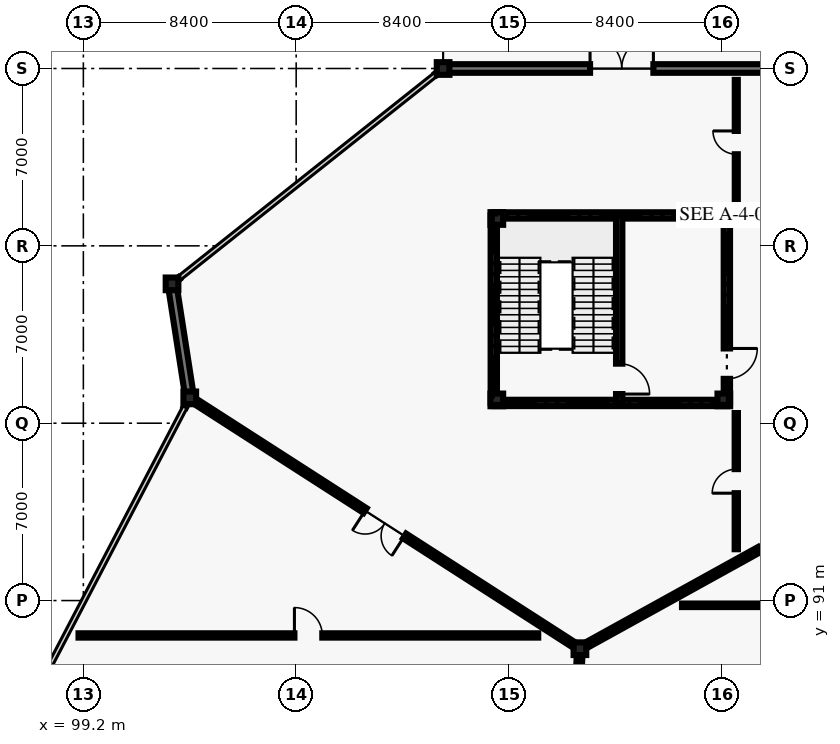
"""IFC4 building model, lengths in metres.
Left out: names, types, materials, properties, quantities, classifications, styles, units other than length and angle.
Written with IfcOpenShell. Run it as: python <this file> out.ifc"""

import sys

from ifc_helpers import new_model, si_unit, direction, frame, frame_2d, origin, origin_2d, place, context, subcontext, project, spatial, rectangle, i_section, extrude, element, fill, save


model = new_model("IFC4")
c1 = context("Model", 3, precision=1e-05, world=origin(), true_north=direction((0.0, 1.0)))
c2 = subcontext(c1, "Body", "Model", "MODEL_VIEW")
j1 = project(units=[si_unit("LENGTHUNIT", "METRE"), si_unit("PLANEANGLEUNIT", "RADIAN")], contexts=[c1])
p1 = place(None, origin())
s1 = spatial("IfcSite", under=j1, at=p1, CompositionType="ELEMENT")
p2 = place(p1, origin())
s2 = spatial("IfcBuilding", under=s1, at=p2, CompositionType="ELEMENT")
p3 = place(p2, origin())
s3 = spatial("IfcBuildingStorey", under=s2, at=p3, CompositionType="ELEMENT", Elevation=0.0)
for number, where, z_axis, x_axis in (
    (1, (102.7, 103.5, 0.0), (0.0, 0.0, 1.0), (1.0, 0.0, 0.0)),
    (2, (103.4, 99.0, 0.0), (0.0, 0.0, 1.0), (1.0, 0.0, 0.0)),
    (3, (113.4, 112.0, 0.0), (0.0, 0.0, 1.0), (1.0, 0.0, 0.0)),
    (4, (118.8, 89.1, 0.0), (0.0, 0.0, 1.0), (1.0, 0.0, 0.0)),
    (5, (115.52, 98.92, 0.0), (0.0, 0.0, 1.0), (1.0, 0.0, 0.0)),
    (6, (124.48, 98.92, 0.0), (0.0, 0.0, 1.0), (1.0, 0.0, 0.0)),
    (7, (124.48, 106.08, 0.0), (0.0, 0.0, 1.0), (1.0, 0.0, 0.0)),
    (8, (115.52, 106.08, 0.0), (0.0, 0.0, 1.0), (1.0, 0.0, 0.0)),
):
    element("IfcColumn", number, at=place(p3, frame(where, z_axis=z_axis, x_axis=x_axis)), inside=s3, PredefinedType="COLUMN", context=c2, shape_type="SweptSolid", body=[
        extrude(i_section(OverallWidth=0.5, OverallDepth=0.5, WebThickness=0.022, FlangeThickness=0.036, at=origin_2d()), origin(), (0.0, 0.0, 1.0), 5.4),
    ])
p4 = place(p3, frame((103.21, 98.637, 0.0), z_axis=(0.0, 0.0, 1.0), x_axis=(0.464243799771, 0.885707454171, 0.0)))
e9 = element("IfcWall", 9, at=p4, inside=s3, PredefinedType="SOLIDWALL", context=c2, shape_type="SweptSolid", body=[
    extrude(rectangle(XDim=0.308, YDim=0.095, at=frame_2d((0.154, 0.0))), origin(), (0.0, 0.0, 1.0), 4.22),
])
p5 = place(p3, frame((113.4, 112.0, 0.0), z_axis=(0.0, 0.0, 1.0), x_axis=(1.0, 0.0, 0.0)))
e10 = element("IfcWall", 10, at=p5, inside=s3, PredefinedType="SOLIDWALL", context=c2, shape_type="SweptSolid", body=[
    extrude(rectangle(XDim=14.1, YDim=0.34, at=frame_2d((7.05, 0.0))), origin(), (0.0, 0.0, 1.0), 4.22),
])
p6 = place(p5, frame((5.8, 0.0, 0.0)))
e11 = element("IfcOpeningElement", 11, at=p6, cuts=e10, PredefinedType="OPENING", context=c2, shape_type="SweptSolid", body=[
    extrude(rectangle(XDim=2.5, YDim=2.45, at=frame_2d((1.25, 1.225))), frame((0.0, 0.18, 0.0), z_axis=(0.0, -1.0, 0.0), x_axis=(1.0, 0.0, 0.0)), (0.0, 0.0, 1.0), 0.36),
])
p7 = place(p3, frame((102.733, 103.526, 0.0), z_axis=(0.0, 0.0, 1.0), x_axis=(0.782180115256, 0.623052379257, 0.0)))
e12 = element("IfcWall", 12, at=p7, inside=s3, PredefinedType="SOLIDWALL", context=c2, shape_type="SweptSolid", body=[
    extrude(rectangle(XDim=0.308, YDim=0.095, at=frame_2d((0.154, 0.0))), origin(), (0.0, 0.0, 1.0), 4.22),
])
p8 = place(p3, frame((113.126, 111.782, 0.0), z_axis=(0.0, 0.0, 1.0), x_axis=(0.781872503851, 0.6234383592, 0.0)))
e13 = element("IfcWall", 13, at=p8, inside=s3, PredefinedType="SOLIDWALL", context=c2, shape_type="SweptSolid", body=[
    extrude(rectangle(XDim=0.308, YDim=0.095, at=frame_2d((0.154, 0.0))), origin(), (0.0, 0.0, 1.0), 4.22),
])
p9 = place(p3, frame((103.391, 99.059, 0.0), z_axis=(0.0, 0.0, 1.0), x_axis=(-0.153783616147, 0.988104548823, 0.0)))
e14 = element("IfcWall", 14, at=p9, inside=s3, PredefinedType="SOLIDWALL", context=c2, shape_type="SweptSolid", body=[
    extrude(rectangle(XDim=4.494, YDim=0.34, at=frame_2d((2.247, 0.0))), origin(), (0.0, 0.0, 1.0), 4.22),
])
p10 = place(p3, frame((117.9, 70.6, 0.0), z_axis=(0.0, 0.0, 1.0), x_axis=(0.048599072515, 0.998818366947, 0.0)))
e15 = element("IfcWall", 15, at=p10, inside=s3, PredefinedType="SOLIDWALL", context=c2, shape_type="SweptSolid", body=[
    extrude(rectangle(XDim=18.522, YDim=0.225, at=frame_2d((9.261, 0.0))), origin(), (0.0, 0.0, 1.0), 4.62),
])
p11 = place(p10, frame((8.261, 0.0, 0.0)))
e16 = element("IfcOpeningElement", 16, at=p11, cuts=e15, PredefinedType="OPENING", context=c2, shape_type="SweptSolid", body=[
    extrude(rectangle(XDim=2.0, YDim=2.5, at=frame_2d((1.0, 1.25))), frame((0.0, 0.123, 0.0), z_axis=(0.0, -1.0, 0.0), x_axis=(1.0, 0.0, 0.0)), (0.0, 0.0, 1.0), 0.245),
])
p12 = place(p3, frame((118.8, 89.1, 0.0), z_axis=(0.0, 0.0, 1.0), x_axis=(-0.841183241423, 0.540750177392, 0.0)))
e17 = element("IfcWall", 17, at=p12, inside=s3, PredefinedType="SOLIDWALL", context=c2, shape_type="SweptSolid", body=[
    extrude(rectangle(XDim=18.308, YDim=0.225, at=frame_2d((9.154, 0.0))), origin(), (0.0, 0.0, 1.0), 4.62),
])
p13 = place(p12, frame((8.229, 0.0, 0.0)))
e18 = element("IfcOpeningElement", 18, at=p13, cuts=e17, PredefinedType="OPENING", context=c2, shape_type="SweptSolid", body=[
    extrude(rectangle(XDim=1.85, YDim=2.4, at=frame_2d((0.925, 1.2))), frame((0.0, 0.123, 0.0), z_axis=(0.0, -1.0, 0.0), x_axis=(1.0, 0.0, 0.0)), (0.0, 0.0, 1.0), 0.245),
])
p14 = place(p3, frame((134.9, 98.0, 0.0), z_axis=(0.0, 0.0, 1.0), x_axis=(-0.875181353329, -0.483794996652, 0.0)))
e19 = element("IfcWall", 19, at=p14, inside=s3, PredefinedType="SOLIDWALL", context=c2, shape_type="SweptSolid", body=[
    extrude(rectangle(XDim=18.396, YDim=0.225, at=frame_2d((9.198, 0.0))), origin(), (0.0, 0.0, 1.0), 4.62),
])
p15 = place(p14, frame((8.098, 0.0, 0.0)))
e20 = element("IfcOpeningElement", 20, at=p15, cuts=e19, PredefinedType="OPENING", context=c2, shape_type="SweptSolid", body=[
    extrude(rectangle(XDim=2.2, YDim=2.6, at=frame_2d((1.1, 1.3))), frame((0.0, 0.123, 0.0), z_axis=(0.0, -1.0, 0.0), x_axis=(1.0, 0.0, 0.0)), (0.0, 0.0, 1.0), 0.245),
])
p16 = place(p3, frame((99.009, 89.623, 0.0), z_axis=(0.0, 0.0, 1.0), x_axis=(1.0, 0.0, 0.0)))
e21 = element("IfcWall", 21, at=p16, inside=s3, PredefinedType="PARTITIONING", context=c2, shape_type="SweptSolid", body=[
    extrude(rectangle(XDim=18.145, YDim=0.17, at=frame_2d((9.073, 0.0))), origin(), (0.0, 0.0, 1.0), 3.92),
])
p17 = place(p16, frame((8.522, 0.0, 0.0)))
e22 = element("IfcOpeningElement", 22, at=p17, cuts=e21, PredefinedType="OPENING", context=c2, shape_type="SweptSolid", body=[
    extrude(rectangle(XDim=1.1, YDim=2.2, at=frame_2d((0.55, 1.1))), frame((0.0, 0.095, 0.0), z_axis=(0.0, -1.0, 0.0), x_axis=(1.0, 0.0, 0.0)), (0.0, 0.0, 1.0), 0.19),
])
p18 = place(p3, frame((122.829, 90.813, 0.0), z_axis=(0.0, 0.0, 1.0), x_axis=(1.0, 0.0, 0.0)))
e23 = element("IfcWall", 23, at=p18, inside=s3, PredefinedType="PARTITIONING", context=c2, shape_type="SweptSolid", body=[
    extrude(rectangle(XDim=16.141, YDim=0.14, at=frame_2d((8.07, 0.0))), origin(), (0.0, 0.0, 1.0), 3.92),
])
p19 = place(p18, frame((7.581, 0.0, 0.0)))
e24 = element("IfcOpeningElement", 24, at=p19, cuts=e23, PredefinedType="OPENING", context=c2, shape_type="SweptSolid", body=[
    extrude(rectangle(XDim=0.98, YDim=2.15, at=frame_2d((0.49, 1.075))), frame((0.0, 0.08, 0.0), z_axis=(0.0, -1.0, 0.0), x_axis=(1.0, 0.0, 0.0)), (0.0, 0.0, 1.0), 0.16),
])
p20 = place(p3, frame((124.972, 93.026, 0.0), z_axis=(0.0, 0.0, 1.0), x_axis=(0.0, 1.0, 0.0)))
e25 = element("IfcWall", 25, at=p20, inside=s3, PredefinedType="PARTITIONING", context=c2, shape_type="SweptSolid", body=[
    extrude(rectangle(XDim=5.374, YDim=0.13, at=frame_2d((2.687, 0.0))), origin(), (0.0, 0.0, 1.0), 3.92),
])
p21 = place(p20, frame((2.212, 0.0, 0.0)))
e26 = element("IfcOpeningElement", 26, at=p21, cuts=e25, PredefinedType="OPENING", context=c2, shape_type="SweptSolid", body=[
    extrude(rectangle(XDim=0.95, YDim=2.15, at=frame_2d((0.475, 1.075))), frame((0.0, 0.075, 0.0), z_axis=(0.0, -1.0, 0.0), x_axis=(1.0, 0.0, 0.0)), (0.0, 0.0, 1.0), 0.15),
])
p22 = place(p3, frame((124.972, 106.6, 0.0), z_axis=(0.0, 0.0, 1.0), x_axis=(0.0, 1.0, 0.0)))
e27 = element("IfcWall", 27, at=p22, inside=s3, PredefinedType="PARTITIONING", context=c2, shape_type="SweptSolid", body=[
    extrude(rectangle(XDim=4.95, YDim=0.12, at=frame_2d((2.475, 0.0))), origin(), (0.0, 0.0, 1.0), 3.92),
])
p23 = place(p22, frame((2.015, 0.0, 0.0)))
e28 = element("IfcOpeningElement", 28, at=p23, cuts=e27, PredefinedType="OPENING", context=c2, shape_type="SweptSolid", body=[
    extrude(rectangle(XDim=0.92, YDim=2.1, at=frame_2d((0.46, 1.05))), frame((0.0, 0.07, 0.0), z_axis=(0.0, -1.0, 0.0), x_axis=(1.0, 0.0, 0.0)), (0.0, 0.0, 1.0), 0.14),
])
p24 = place(p3, frame((115.4, 98.8, 0.0), z_axis=(0.0, 0.0, 1.0), x_axis=(0.0, 1.0, 0.0)))
e29 = element("IfcWall", 29, at=p24, inside=s3, PredefinedType="SHEAR", context=c2, shape_type="SweptSolid", body=[
    extrude(rectangle(XDim=7.4, YDim=0.25, at=frame_2d((3.7, 0.0))), origin(), (0.0, 0.0, 1.0), 5.16),
])
for number, where, z_axis, x_axis in (
    (30, (115.4, 106.2, 0.0), (0.0, 0.0, 1.0), (1.0, 0.0, 0.0)),
    (31, (124.6, 98.8, 0.0), (0.0, 0.0, 1.0), (-1.0, 0.0, 0.0)),
):
    element("IfcWall", number, at=place(p3, frame(where, z_axis=z_axis, x_axis=x_axis)), inside=s3, PredefinedType="SHEAR", context=c2, shape_type="SweptSolid", body=[
        extrude(rectangle(XDim=9.2, YDim=0.25, at=frame_2d((4.6, 0.0))), origin(), (0.0, 0.0, 1.0), 5.16),
    ])
p25 = place(p3, frame((124.6, 106.2, 0.0), z_axis=(0.0, 0.0, 1.0), x_axis=(0.0, -1.0, 0.0)))
e32 = element("IfcWall", 32, at=p25, inside=s3, PredefinedType="SHEAR", context=c2, shape_type="SweptSolid", body=[
    extrude(rectangle(XDim=7.4, YDim=0.25, at=frame_2d((3.7, 0.0))), origin(), (0.0, 0.0, 1.0), 5.16),
])
p26 = place(p25, frame((5.25, 0.0, 0.0)))
e33 = element("IfcOpeningElement", 33, at=p26, cuts=e32, PredefinedType="OPENING", context=c2, shape_type="SweptSolid", body=[
    extrude(rectangle(XDim=1.2, YDim=2.2, at=frame_2d((0.6, 1.1))), frame((0.0, 0.135, 0.0), z_axis=(0.0, -1.0, 0.0), x_axis=(1.0, 0.0, 0.0)), (0.0, 0.0, 1.0), 0.27),
])
p27 = place(p3, frame((120.35, 106.2, 0.0), z_axis=(0.0, 0.0, 1.0), x_axis=(0.0, -1.0, 0.0)))
e34 = element("IfcWall", 34, at=p27, inside=s3, PredefinedType="SHEAR", context=c2, shape_type="SweptSolid", body=[
    extrude(rectangle(XDim=7.4, YDim=0.25, at=frame_2d((3.7, 0.0))), origin(), (0.0, 0.0, 1.0), 5.16),
])
p28 = place(p27, frame((5.85, 0.0, 0.0)))
e35 = element("IfcOpeningElement", 35, at=p28, cuts=e34, PredefinedType="OPENING", context=c2, shape_type="SweptSolid", body=[
    extrude(rectangle(XDim=1.2, YDim=2.2, at=frame_2d((0.6, 1.1))), frame((0.0, 0.135, 0.0), z_axis=(0.0, -1.0, 0.0), x_axis=(1.0, 0.0, 0.0)), (0.0, 0.0, 1.0), 0.27),
])
p29 = place(p6, origin())
e36 = element("IfcDoor", 36, at=p29, inside=s3, OperationType="DOUBLE_DOOR_SINGLE_SWING", PredefinedType="DOOR", context=c2, shape_type="SweptSolid", body=[
    extrude(rectangle(XDim=2.5, YDim=2.45, at=frame_2d((1.25, 1.225))), frame((0.0, 0.025, 0.0), z_axis=(0.0, -1.0, 0.0), x_axis=(1.0, 0.0, 0.0)), (0.0, 0.0, 1.0), 0.05),
])
fill(e11, e36)
p30 = place(p13, origin())
e37 = element("IfcDoor", 37, at=p30, inside=s3, OperationType="DOUBLE_DOOR_SINGLE_SWING", PredefinedType="DOOR", context=c2, shape_type="SweptSolid", body=[
    extrude(rectangle(XDim=1.85, YDim=2.4, at=frame_2d((0.925, 1.2))), frame((0.0, 0.025, 0.0), z_axis=(0.0, -1.0, 0.0), x_axis=(1.0, 0.0, 0.0)), (0.0, 0.0, 1.0), 0.05),
])
fill(e18, e37)
p31 = place(p15, origin())
e38 = element("IfcDoor", 38, at=p31, inside=s3, OperationType="DOUBLE_DOOR_SINGLE_SWING", PredefinedType="DOOR", context=c2, shape_type="SweptSolid", body=[
    extrude(rectangle(XDim=2.2, YDim=2.6, at=frame_2d((1.1, 1.3))), frame((0.0, 0.025, 0.0), z_axis=(0.0, -1.0, 0.0), x_axis=(1.0, 0.0, 0.0)), (0.0, 0.0, 1.0), 0.05),
])
fill(e20, e38)
p32 = place(p17, origin())
e39 = element("IfcDoor", 39, at=p32, inside=s3, OperationType="SINGLE_SWING_LEFT", PredefinedType="DOOR", context=c2, shape_type="SweptSolid", body=[
    extrude(rectangle(XDim=1.1, YDim=2.2, at=frame_2d((0.55, 1.1))), frame((0.0, 0.025, 0.0), z_axis=(0.0, -1.0, 0.0), x_axis=(1.0, 0.0, 0.0)), (0.0, 0.0, 1.0), 0.05),
])
fill(e22, e39)
p33 = place(p21, origin())
e40 = element("IfcDoor", 40, at=p33, inside=s3, OperationType="SINGLE_SWING_LEFT", PredefinedType="DOOR", context=c2, shape_type="SweptSolid", body=[
    extrude(rectangle(XDim=0.95, YDim=2.15, at=frame_2d((0.475, 1.075))), frame((0.0, 0.025, 0.0), z_axis=(0.0, -1.0, 0.0), x_axis=(1.0, 0.0, 0.0)), (0.0, 0.0, 1.0), 0.05),
])
fill(e26, e40)
p34 = place(p23, origin())
e41 = element("IfcDoor", 41, at=p34, inside=s3, OperationType="SINGLE_SWING_RIGHT", PredefinedType="DOOR", context=c2, shape_type="SweptSolid", body=[
    extrude(rectangle(XDim=0.92, YDim=2.1, at=frame_2d((0.46, 1.05))), frame((0.0, 0.025, 0.0), z_axis=(0.0, -1.0, 0.0), x_axis=(1.0, 0.0, 0.0)), (0.0, 0.0, 1.0), 0.05),
])
fill(e28, e41)
p35 = place(p26, origin())
e42 = element("IfcDoor", 42, at=p35, inside=s3, OperationType="SINGLE_SWING_LEFT", PredefinedType="DOOR", context=c2, shape_type="SweptSolid", body=[
    extrude(rectangle(XDim=1.2, YDim=2.2, at=frame_2d((0.6, 1.1))), frame((0.0, 0.025, 0.0), z_axis=(0.0, -1.0, 0.0), x_axis=(1.0, 0.0, 0.0)), (0.0, 0.0, 1.0), 0.05),
])
fill(e33, e42)
p36 = place(p28, origin())
e43 = element("IfcDoor", 43, at=p36, inside=s3, OperationType="SINGLE_SWING_RIGHT", PredefinedType="DOOR", context=c2, shape_type="SweptSolid", body=[
    extrude(rectangle(XDim=1.2, YDim=2.2, at=frame_2d((0.6, 1.1))), frame((0.0, 0.025, 0.0), z_axis=(0.0, -1.0, 0.0), x_axis=(1.0, 0.0, 0.0)), (0.0, 0.0, 1.0), 0.05),
])
fill(e35, e43)
save(model, sys.argv[1])
